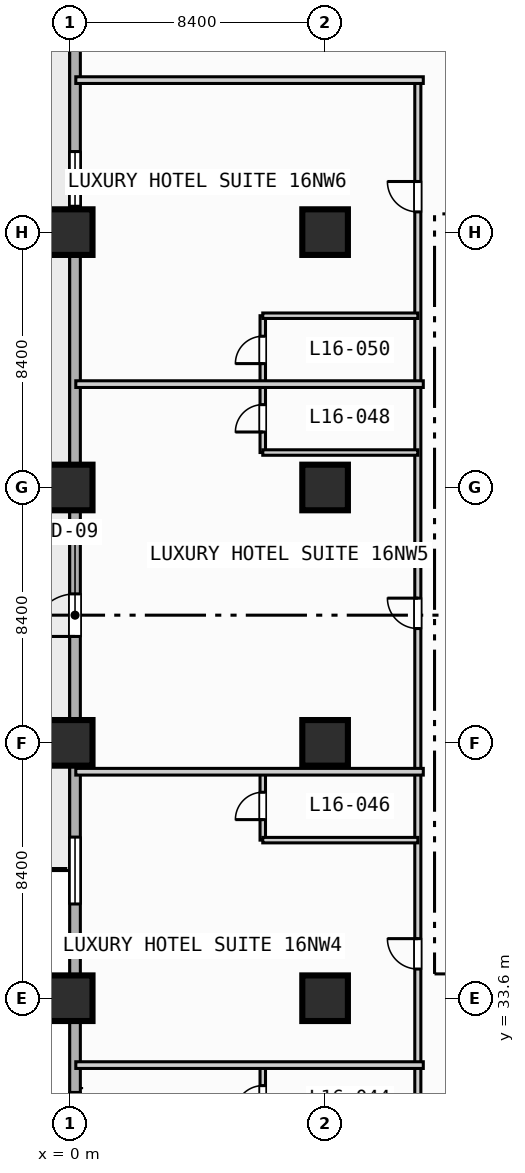
"""IFC4 building model, lengths in metres.
Left out: names, types, materials, properties, quantities, classifications, styles, units other than length and angle.
Written with IfcOpenShell. Run it as: python <this file> out.ifc"""

import sys

from ifc_helpers import new_model, si_unit, direction, frame, frame_2d, origin, origin_2d, place, context, subcontext, project, spatial, rectangle, extrude, element, fill, save


model = new_model("IFC4")
c1 = context("Model", 3, precision=1e-05, world=origin(), true_north=direction((0.0, 1.0)))
c2 = subcontext(c1, "Body", "Model", "MODEL_VIEW")
j1 = project(units=[si_unit("LENGTHUNIT", "METRE"), si_unit("PLANEANGLEUNIT", "RADIAN")], contexts=[c1])
p1 = place(None, origin())
s1 = spatial("IfcSite", under=j1, at=p1, CompositionType="ELEMENT")
p2 = place(p1, origin())
s2 = spatial("IfcBuilding", under=s1, at=p2, CompositionType="ELEMENT")
p3 = place(p2, frame((0.0, 0.0, 70.0)))
s3 = spatial("IfcBuildingStorey", under=s2, at=p3, CompositionType="ELEMENT", Elevation=70.0)
for number, where, z_axis, x_axis in (
    (1, (0.0, 33.6, 0.0), (0.0, 0.0, 1.0), (1.0, 0.0, 0.0)),
    (2, (0.0, 42.0, 0.0), (0.0, 0.0, 1.0), (1.0, 0.0, 0.0)),
    (3, (0.0, 50.4, 0.0), (0.0, 0.0, 1.0), (1.0, 0.0, 0.0)),
    (4, (0.0, 58.8, 0.0), (0.0, 0.0, 1.0), (1.0, 0.0, 0.0)),
    (5, (8.4, 33.6, 0.0), (0.0, 0.0, 1.0), (1.0, 0.0, 0.0)),
    (6, (8.4, 42.0, 0.0), (0.0, 0.0, 1.0), (1.0, 0.0, 0.0)),
    (7, (8.4, 50.4, 0.0), (0.0, 0.0, 1.0), (1.0, 0.0, 0.0)),
    (8, (8.4, 58.8, 0.0), (0.0, 0.0, 1.0), (1.0, 0.0, 0.0)),
):
    element("IfcColumn", number, at=place(p3, frame(where, z_axis=z_axis, x_axis=x_axis)), inside=s3, PredefinedType="COLUMN", context=c2, shape_type="SweptSolid", body=[
        extrude(rectangle(XDim=1.5, YDim=1.5, at=origin_2d()), origin(), (0.0, 0.0, 1.0), 3.8),
    ])
p4 = place(p3, frame((0.175, 3.175, 0.0), z_axis=(0.0, 0.0, 1.0), x_axis=(0.0, 1.0, 0.0)))
e9 = element("IfcWall", 9, at=p4, inside=s3, PredefinedType="STANDARD", context=c2, shape_type="SweptSolid", body=[
    extrude(rectangle(XDim=86.05, YDim=0.35, at=frame_2d((43.025, 0.0))), origin(), (0.0, 0.0, 1.0), 3.55),
])
p5 = place(p4, frame((42.325, 0.0, 0.0)))
e10 = element("IfcOpeningElement", 10, at=p5, cuts=e9, PredefinedType="OPENING", context=c2, shape_type="SweptSolid", body=[
    extrude(rectangle(XDim=1.4, YDim=2.2, at=frame_2d((0.7, 1.1))), frame((0.0, 0.185, 0.0), z_axis=(0.0, -1.0, 0.0), x_axis=(1.0, 0.0, 0.0)), (0.0, 0.0, 1.0), 0.37),
])
p6 = place(p4, frame((8.325, 0.0, 0.85)))
e11 = element("IfcOpeningElement", 11, at=p6, cuts=e9, PredefinedType="OPENING", context=c2, shape_type="SweptSolid", body=[
    extrude(rectangle(XDim=2.2, YDim=1.8, at=frame_2d((1.1, 0.9))), frame((0.0, 0.185, 0.0), z_axis=(0.0, -1.0, 0.0), x_axis=(1.0, 0.0, 0.0)), (0.0, 0.0, 1.0), 0.37),
])
p7 = place(p4, frame((16.725, 0.0, 0.85)))
e12 = element("IfcOpeningElement", 12, at=p7, cuts=e9, PredefinedType="OPENING", context=c2, shape_type="SweptSolid", body=[
    extrude(rectangle(XDim=2.2, YDim=1.8, at=frame_2d((1.1, 0.9))), frame((0.0, 0.185, 0.0), z_axis=(0.0, -1.0, 0.0), x_axis=(1.0, 0.0, 0.0)), (0.0, 0.0, 1.0), 0.37),
])
p8 = place(p4, frame((25.125, 0.0, 0.85)))
e13 = element("IfcOpeningElement", 13, at=p8, cuts=e9, PredefinedType="OPENING", context=c2, shape_type="SweptSolid", body=[
    extrude(rectangle(XDim=2.2, YDim=1.8, at=frame_2d((1.1, 0.9))), frame((0.0, 0.185, 0.0), z_axis=(0.0, -1.0, 0.0), x_axis=(1.0, 0.0, 0.0)), (0.0, 0.0, 1.0), 0.37),
])
p9 = place(p4, frame((33.525, 0.0, 0.85)))
e14 = element("IfcOpeningElement", 14, at=p9, cuts=e9, PredefinedType="OPENING", context=c2, shape_type="SweptSolid", body=[
    extrude(rectangle(XDim=2.2, YDim=1.8, at=frame_2d((1.1, 0.9))), frame((0.0, 0.185, 0.0), z_axis=(0.0, -1.0, 0.0), x_axis=(1.0, 0.0, 0.0)), (0.0, 0.0, 1.0), 0.37),
])
p10 = place(p4, frame((2.375, 0.0, 0.85)))
e15 = element("IfcOpeningElement", 15, at=p10, cuts=e9, PredefinedType="OPENING", context=c2, shape_type="SweptSolid", body=[
    extrude(rectangle(XDim=1.8, YDim=1.8, at=frame_2d((0.9, 0.9))), frame((0.0, 0.185, 0.0), z_axis=(0.0, -1.0, 0.0), x_axis=(1.0, 0.0, 0.0)), (0.0, 0.0, 1.0), 0.37),
])
p11 = place(p4, frame((56.475, 0.0, 0.85)))
e16 = element("IfcOpeningElement", 16, at=p11, cuts=e9, PredefinedType="OPENING", context=c2, shape_type="SweptSolid", body=[
    extrude(rectangle(XDim=1.8, YDim=1.8, at=frame_2d((0.9, 0.9))), frame((0.0, 0.185, 0.0), z_axis=(0.0, -1.0, 0.0), x_axis=(1.0, 0.0, 0.0)), (0.0, 0.0, 1.0), 0.37),
])
p12 = place(p3, frame((11.45, 3.4, 0.0), z_axis=(0.0, 0.0, 1.0), x_axis=(0.0, 1.0, 0.0)))
e17 = element("IfcWall", 17, at=p12, inside=s3, PredefinedType="PARTITIONING", context=c2, shape_type="SweptSolid", body=[
    extrude(rectangle(XDim=60.4, YDim=0.2, at=frame_2d((30.2, 0.0))), origin(), (0.0, 0.0, 1.0), 3.55),
])
p13 = place(p12, frame((4.465, 0.0, 0.0)))
e18 = element("IfcOpeningElement", 18, at=p13, cuts=e17, PredefinedType="OPENING", context=c2, shape_type="SweptSolid", body=[
    extrude(rectangle(XDim=1.0, YDim=2.15, at=frame_2d((0.5, 1.075))), frame((0.0, 0.11, 0.0), z_axis=(0.0, -1.0, 0.0), x_axis=(1.0, 0.0, 0.0)), (0.0, 0.0, 1.0), 0.22),
])
p14 = place(p12, frame((14.665, 0.0, 0.0)))
e19 = element("IfcOpeningElement", 19, at=p14, cuts=e17, PredefinedType="OPENING", context=c2, shape_type="SweptSolid", body=[
    extrude(rectangle(XDim=1.0, YDim=2.15, at=frame_2d((0.5, 1.075))), frame((0.0, 0.11, 0.0), z_axis=(0.0, -1.0, 0.0), x_axis=(1.0, 0.0, 0.0)), (0.0, 0.0, 1.0), 0.22),
])
p15 = place(p12, frame((22.535, 0.0, 0.0)))
e20 = element("IfcOpeningElement", 20, at=p15, cuts=e17, PredefinedType="OPENING", context=c2, shape_type="SweptSolid", body=[
    extrude(rectangle(XDim=1.0, YDim=2.15, at=frame_2d((0.5, 1.075))), frame((0.0, 0.11, 0.0), z_axis=(0.0, -1.0, 0.0), x_axis=(1.0, 0.0, 0.0)), (0.0, 0.0, 1.0), 0.22),
])
p16 = place(p12, frame((31.16, 0.0, 0.0)))
e21 = element("IfcOpeningElement", 21, at=p16, cuts=e17, PredefinedType="OPENING", context=c2, shape_type="SweptSolid", body=[
    extrude(rectangle(XDim=1.0, YDim=2.15, at=frame_2d((0.5, 1.075))), frame((0.0, 0.11, 0.0), z_axis=(0.0, -1.0, 0.0), x_axis=(1.0, 0.0, 0.0)), (0.0, 0.0, 1.0), 0.22),
])
p17 = place(p12, frame((42.36, 0.0, 0.0)))
e22 = element("IfcOpeningElement", 22, at=p17, cuts=e17, PredefinedType="OPENING", context=c2, shape_type="SweptSolid", body=[
    extrude(rectangle(XDim=1.0, YDim=2.15, at=frame_2d((0.5, 1.075))), frame((0.0, 0.11, 0.0), z_axis=(0.0, -1.0, 0.0), x_axis=(1.0, 0.0, 0.0)), (0.0, 0.0, 1.0), 0.22),
])
p18 = place(p12, frame((56.065, 0.0, 0.0)))
e23 = element("IfcOpeningElement", 23, at=p18, cuts=e17, PredefinedType="OPENING", context=c2, shape_type="SweptSolid", body=[
    extrude(rectangle(XDim=1.0, YDim=2.15, at=frame_2d((0.5, 1.075))), frame((0.0, 0.11, 0.0), z_axis=(0.0, -1.0, 0.0), x_axis=(1.0, 0.0, 0.0)), (0.0, 0.0, 1.0), 0.22),
])
p19 = place(p3, frame((6.35, 29.15, 0.0), z_axis=(0.0, 0.0, 1.0), x_axis=(0.0, 1.0, 0.0)))
e24 = element("IfcWall", 24, at=p19, inside=s3, PredefinedType="PLUMBINGWALL", context=c2, shape_type="SweptSolid", body=[
    extrude(rectangle(XDim=2.25, YDim=0.18, at=frame_2d((1.125, 0.0))), origin(), (0.0, 0.0, 1.0), 3.55),
])
p20 = place(p19, frame((0.675, 0.0, 0.0)))
e25 = element("IfcOpeningElement", 25, at=p20, cuts=e24, PredefinedType="OPENING", context=c2, shape_type="SweptSolid", body=[
    extrude(rectangle(XDim=0.9, YDim=2.1, at=frame_2d((0.45, 1.05))), frame((0.0, 0.1, 0.0), z_axis=(0.0, -1.0, 0.0), x_axis=(1.0, 0.0, 0.0)), (0.0, 0.0, 1.0), 0.2),
])
p21 = place(p3, frame((0.2, 31.4, 0.0), z_axis=(0.0, 0.0, 1.0), x_axis=(1.0, 0.0, 0.0)))
e26 = element("IfcWall", 26, at=p21, inside=s3, PredefinedType="PARTITIONING", context=c2, shape_type="SweptSolid", body=[
    extrude(rectangle(XDim=11.43, YDim=0.22, at=frame_2d((5.715, 0.0))), origin(), (0.0, 0.0, 1.0), 3.55),
])
p22 = place(p3, frame((6.35, 38.8, 0.0), z_axis=(0.0, 0.0, 1.0), x_axis=(0.0, 1.0, 0.0)))
e27 = element("IfcWall", 27, at=p22, inside=s3, PredefinedType="PLUMBINGWALL", context=c2, shape_type="SweptSolid", body=[
    extrude(rectangle(XDim=2.25, YDim=0.18, at=frame_2d((1.125, 0.0))), origin(), (0.0, 0.0, 1.0), 3.55),
])
p23 = place(p22, frame((0.675, 0.0, 0.0)))
e28 = element("IfcOpeningElement", 28, at=p23, cuts=e27, PredefinedType="OPENING", context=c2, shape_type="SweptSolid", body=[
    extrude(rectangle(XDim=0.9, YDim=2.1, at=frame_2d((0.45, 1.05))), frame((0.0, 0.1, 0.0), z_axis=(0.0, -1.0, 0.0), x_axis=(1.0, 0.0, 0.0)), (0.0, 0.0, 1.0), 0.2),
])
p24 = place(p3, frame((6.35, 38.8, 0.0), z_axis=(0.0, 0.0, 1.0), x_axis=(1.0, 0.0, 0.0)))
e29 = element("IfcWall", 29, at=p24, inside=s3, PredefinedType="PLUMBINGWALL", context=c2, shape_type="SweptSolid", body=[
    extrude(rectangle(XDim=5.1, YDim=0.18, at=frame_2d((2.55, 0.0))), origin(), (0.0, 0.0, 1.0), 3.55),
])
p25 = place(p3, frame((0.2, 41.05, 0.0), z_axis=(0.0, 0.0, 1.0), x_axis=(1.0, 0.0, 0.0)))
e30 = element("IfcWall", 30, at=p25, inside=s3, PredefinedType="PARTITIONING", context=c2, shape_type="SweptSolid", body=[
    extrude(rectangle(XDim=11.43, YDim=0.22, at=frame_2d((5.715, 0.0))), origin(), (0.0, 0.0, 1.0), 3.55),
])
p26 = place(p3, frame((6.35, 51.55, 0.0), z_axis=(0.0, 0.0, 1.0), x_axis=(0.0, 1.0, 0.0)))
e31 = element("IfcWall", 31, at=p26, inside=s3, PredefinedType="PLUMBINGWALL", context=c2, shape_type="SweptSolid", body=[
    extrude(rectangle(XDim=4.5, YDim=0.18, at=frame_2d((2.25, 0.0))), origin(), (0.0, 0.0, 1.0), 3.55),
])
p27 = place(p26, frame((0.675, 0.0, 0.0)))
e32 = element("IfcOpeningElement", 32, at=p27, cuts=e31, PredefinedType="OPENING", context=c2, shape_type="SweptSolid", body=[
    extrude(rectangle(XDim=0.9, YDim=2.1, at=frame_2d((0.45, 1.05))), frame((0.0, 0.1, 0.0), z_axis=(0.0, -1.0, 0.0), x_axis=(1.0, 0.0, 0.0)), (0.0, 0.0, 1.0), 0.2),
])
p28 = place(p26, frame((2.925, 0.0, 0.0)))
e33 = element("IfcOpeningElement", 33, at=p28, cuts=e31, PredefinedType="OPENING", context=c2, shape_type="SweptSolid", body=[
    extrude(rectangle(XDim=0.9, YDim=2.1, at=frame_2d((0.45, 1.05))), frame((0.0, 0.1, 0.0), z_axis=(0.0, -1.0, 0.0), x_axis=(1.0, 0.0, 0.0)), (0.0, 0.0, 1.0), 0.2),
])
p29 = place(p3, frame((6.35, 51.55, 0.0), z_axis=(0.0, 0.0, 1.0), x_axis=(1.0, 0.0, 0.0)))
e34 = element("IfcWall", 34, at=p29, inside=s3, PredefinedType="PLUMBINGWALL", context=c2, shape_type="SweptSolid", body=[
    extrude(rectangle(XDim=5.1, YDim=0.18, at=frame_2d((2.55, 0.0))), origin(), (0.0, 0.0, 1.0), 3.55),
])
for number, where, z_axis, x_axis in (
    (35, (0.2, 53.8, 0.0), (0.0, 0.0, 1.0), (1.0, 0.0, 0.0)),
    (36, (0.2, 63.8, 0.0), (0.0, 0.0, 1.0), (1.0, 0.0, 0.0)),
):
    element("IfcWall", number, at=place(p3, frame(where, z_axis=z_axis, x_axis=x_axis)), inside=s3, PredefinedType="PARTITIONING", context=c2, shape_type="SweptSolid", body=[
        extrude(rectangle(XDim=11.43, YDim=0.22, at=frame_2d((5.715, 0.0))), origin(), (0.0, 0.0, 1.0), 3.55),
    ])
p30 = place(p3, frame((6.35, 56.05, 0.0), z_axis=(0.0, 0.0, 1.0), x_axis=(1.0, 0.0, 0.0)))
e37 = element("IfcWall", 37, at=p30, inside=s3, PredefinedType="PLUMBINGWALL", context=c2, shape_type="SweptSolid", body=[
    extrude(rectangle(XDim=5.1, YDim=0.18, at=frame_2d((2.55, 0.0))), origin(), (0.0, 0.0, 1.0), 3.55),
])
p31 = place(p5, origin())
e38 = element("IfcDoor", 38, at=p31, inside=s3, OperationType="SINGLE_SWING_LEFT", PredefinedType="DOOR", context=c2, shape_type="SweptSolid", body=[
    extrude(rectangle(XDim=1.4, YDim=2.2, at=frame_2d((0.7, 1.1))), frame((0.0, 0.025, 0.0), z_axis=(0.0, -1.0, 0.0), x_axis=(1.0, 0.0, 0.0)), (0.0, 0.0, 1.0), 0.05),
])
fill(e10, e38)
p32 = place(p8, origin())
e39 = element("IfcWindow", 39, at=p32, inside=s3, PartitioningType="SINGLE_PANEL", PredefinedType="WINDOW", context=c2, shape_type="SweptSolid", body=[
    extrude(rectangle(XDim=2.2, YDim=1.8, at=frame_2d((1.1, 0.9))), frame((0.0, 0.03, 0.0), z_axis=(0.0, -1.0, 0.0), x_axis=(1.0, 0.0, 0.0)), (0.0, 0.0, 1.0), 0.06),
])
fill(e13, e39)
p33 = place(p9, origin())
e40 = element("IfcWindow", 40, at=p33, inside=s3, PartitioningType="SINGLE_PANEL", PredefinedType="WINDOW", context=c2, shape_type="SweptSolid", body=[
    extrude(rectangle(XDim=2.2, YDim=1.8, at=frame_2d((1.1, 0.9))), frame((0.0, 0.03, 0.0), z_axis=(0.0, -1.0, 0.0), x_axis=(1.0, 0.0, 0.0)), (0.0, 0.0, 1.0), 0.06),
])
fill(e14, e40)
p34 = place(p11, origin())
e41 = element("IfcWindow", 41, at=p34, inside=s3, PartitioningType="SINGLE_PANEL", PredefinedType="WINDOW", context=c2, shape_type="SweptSolid", body=[
    extrude(rectangle(XDim=1.8, YDim=1.8, at=frame_2d((0.9, 0.9))), frame((0.0, 0.03, 0.0), z_axis=(0.0, -1.0, 0.0), x_axis=(1.0, 0.0, 0.0)), (0.0, 0.0, 1.0), 0.06),
])
fill(e16, e41)
p35 = place(p16, origin())
e42 = element("IfcDoor", 42, at=p35, inside=s3, OperationType="SINGLE_SWING_RIGHT", PredefinedType="DOOR", context=c2, shape_type="SweptSolid", body=[
    extrude(rectangle(XDim=1.0, YDim=2.15, at=frame_2d((0.5, 1.075))), frame((0.0, 0.025, 0.0), z_axis=(0.0, -1.0, 0.0), x_axis=(1.0, 0.0, 0.0)), (0.0, 0.0, 1.0), 0.05),
])
fill(e21, e42)
p36 = place(p17, origin())
e43 = element("IfcDoor", 43, at=p36, inside=s3, OperationType="SINGLE_SWING_RIGHT", PredefinedType="DOOR", context=c2, shape_type="SweptSolid", body=[
    extrude(rectangle(XDim=1.0, YDim=2.15, at=frame_2d((0.5, 1.075))), frame((0.0, 0.025, 0.0), z_axis=(0.0, -1.0, 0.0), x_axis=(1.0, 0.0, 0.0)), (0.0, 0.0, 1.0), 0.05),
])
fill(e22, e43)
p37 = place(p18, origin())
e44 = element("IfcDoor", 44, at=p37, inside=s3, OperationType="SINGLE_SWING_RIGHT", PredefinedType="DOOR", context=c2, shape_type="SweptSolid", body=[
    extrude(rectangle(XDim=1.0, YDim=2.15, at=frame_2d((0.5, 1.075))), frame((0.0, 0.025, 0.0), z_axis=(0.0, -1.0, 0.0), x_axis=(1.0, 0.0, 0.0)), (0.0, 0.0, 1.0), 0.05),
])
fill(e23, e44)
p38 = place(p20, origin())
e45 = element("IfcDoor", 45, at=p38, inside=s3, OperationType="SINGLE_SWING_LEFT", PredefinedType="DOOR", context=c2, shape_type="SweptSolid", body=[
    extrude(rectangle(XDim=0.9, YDim=2.1, at=frame_2d((0.45, 1.05))), frame((0.0, 0.025, 0.0), z_axis=(0.0, -1.0, 0.0), x_axis=(1.0, 0.0, 0.0)), (0.0, 0.0, 1.0), 0.05),
])
fill(e25, e45)
p39 = place(p23, origin())
e46 = element("IfcDoor", 46, at=p39, inside=s3, OperationType="SINGLE_SWING_LEFT", PredefinedType="DOOR", context=c2, shape_type="SweptSolid", body=[
    extrude(rectangle(XDim=0.9, YDim=2.1, at=frame_2d((0.45, 1.05))), frame((0.0, 0.025, 0.0), z_axis=(0.0, -1.0, 0.0), x_axis=(1.0, 0.0, 0.0)), (0.0, 0.0, 1.0), 0.05),
])
fill(e28, e46)
p40 = place(p27, origin())
e47 = element("IfcDoor", 47, at=p40, inside=s3, OperationType="SINGLE_SWING_LEFT", PredefinedType="DOOR", context=c2, shape_type="SweptSolid", body=[
    extrude(rectangle(XDim=0.9, YDim=2.1, at=frame_2d((0.45, 1.05))), frame((0.0, 0.025, 0.0), z_axis=(0.0, -1.0, 0.0), x_axis=(1.0, 0.0, 0.0)), (0.0, 0.0, 1.0), 0.05),
])
fill(e32, e47)
p41 = place(p28, origin())
e48 = element("IfcDoor", 48, at=p41, inside=s3, OperationType="SINGLE_SWING_LEFT", PredefinedType="DOOR", context=c2, shape_type="SweptSolid", body=[
    extrude(rectangle(XDim=0.9, YDim=2.1, at=frame_2d((0.45, 1.05))), frame((0.0, 0.025, 0.0), z_axis=(0.0, -1.0, 0.0), x_axis=(1.0, 0.0, 0.0)), (0.0, 0.0, 1.0), 0.05),
])
fill(e33, e48)
save(model, sys.argv[1])
